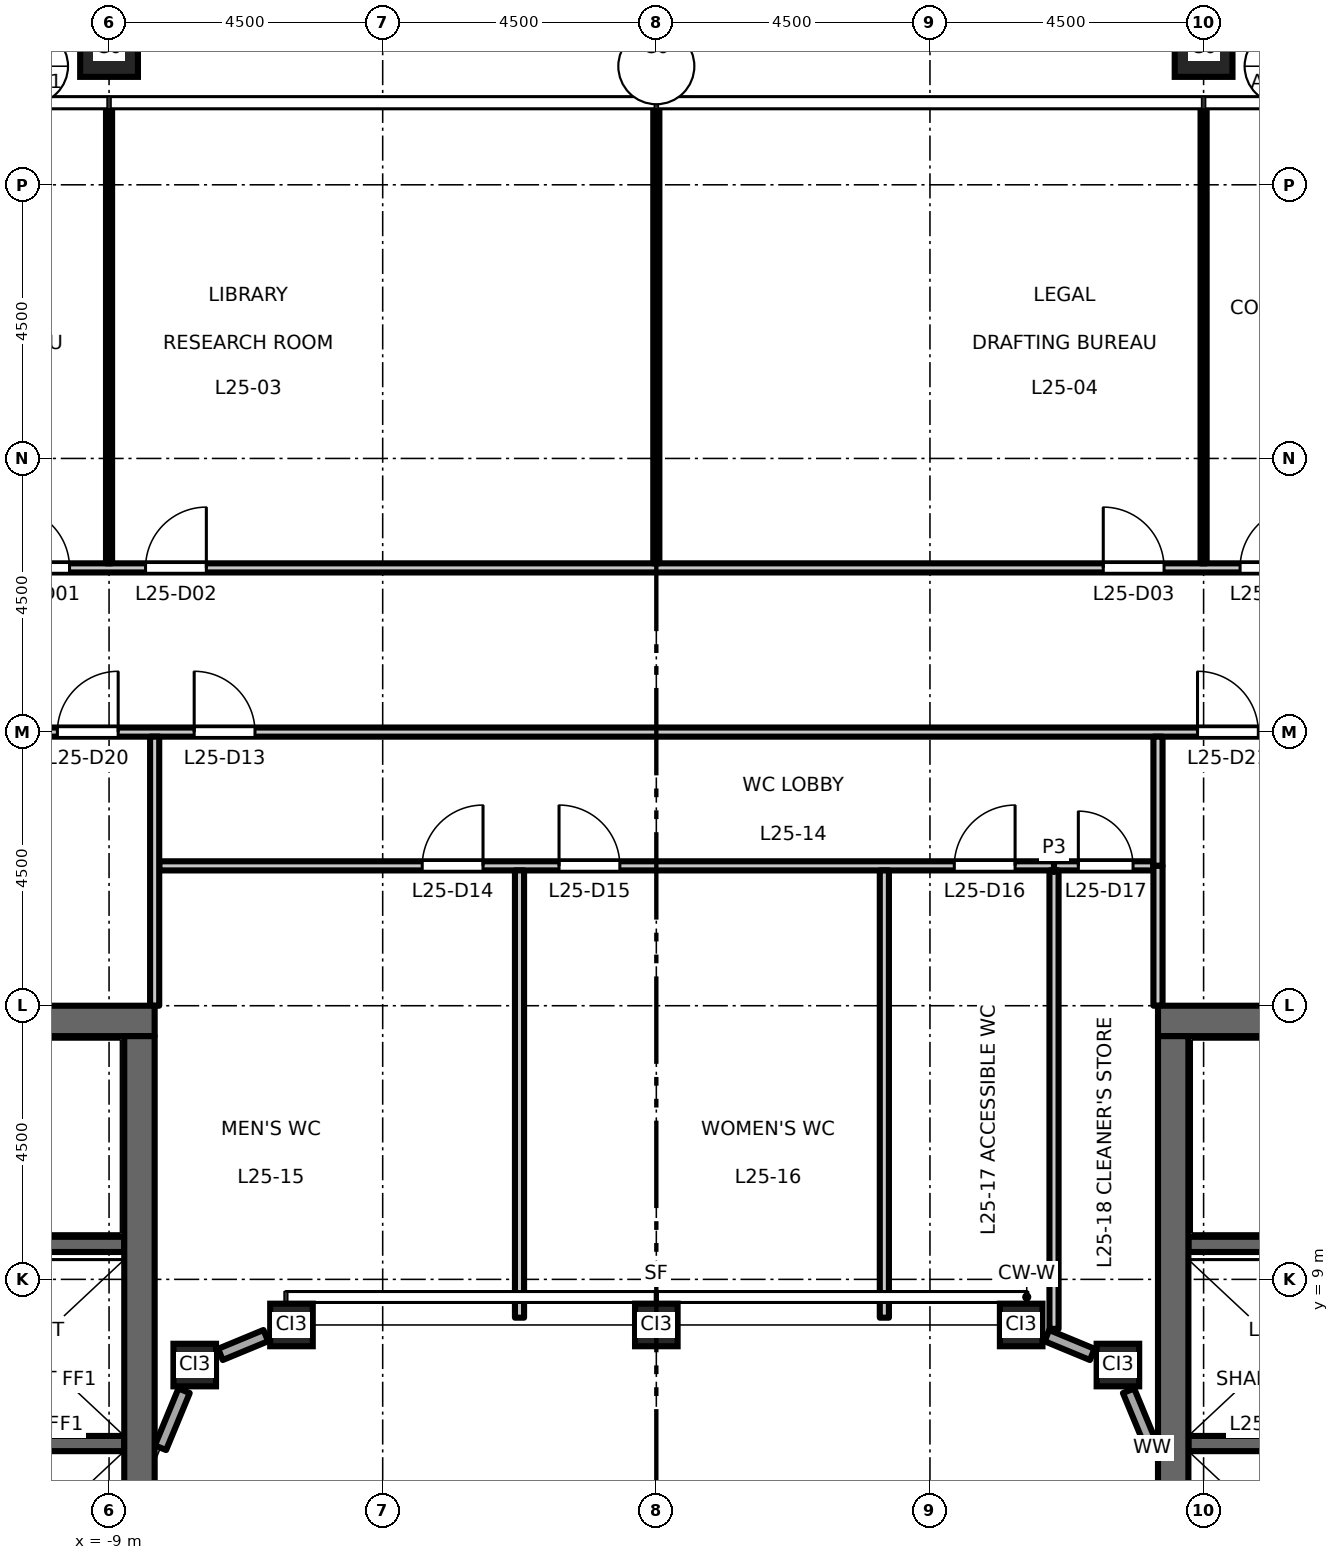
"""IFC4 building model, lengths in metres.
Left out: names, types, materials, properties, quantities, classifications, styles, units other than length and angle.
Written with IfcOpenShell. Run it as: python <this file> out.ifc"""

import sys

from ifc_helpers import new_model, si_unit, direction, frame, frame_2d, origin, origin_2d, place, context, subcontext, project, spatial, rectangle, hollow_rectangle, extrude, element, fill, save


model = new_model("IFC4")
c1 = context("Model", 3, precision=1e-05, world=origin(), true_north=direction((0.0, 1.0)))
c2 = subcontext(c1, "Body", "Model", "MODEL_VIEW")
j1 = project(units=[si_unit("LENGTHUNIT", "METRE"), si_unit("PLANEANGLEUNIT", "RADIAN")], contexts=[c1])
p1 = place(None, origin())
s1 = spatial("IfcSite", under=j1, at=p1, CompositionType="ELEMENT")
p2 = place(p1, origin())
s2 = spatial("IfcBuilding", under=s1, at=p2, CompositionType="ELEMENT")
p3 = place(p2, frame((0.0, 0.0, 118.2)))
s3 = spatial("IfcBuildingStorey", under=s2, at=p3, CompositionType="ELEMENT", Elevation=118.2)
for number, where, z_axis, x_axis in (
    (1, (9.0, 29.25, 0.0), (0.0, 0.0, 1.0), (1.0, 0.0, 0.0)),
    (2, (0.0, 29.25, 0.0), (0.0, 0.0, 1.0), (1.0, 0.0, 0.0)),
    (3, (-9.0, 29.25, 0.0), (0.0, 0.0, 1.0), (1.0, 0.0, 0.0)),
):
    element("IfcColumn", number, at=place(p3, frame(where, z_axis=z_axis, x_axis=x_axis)), inside=s3, PredefinedType="COLUMN", context=c2, shape_type="SweptSolid", body=[
        extrude(hollow_rectangle(XDim=0.95, YDim=0.95, WallThickness=0.055, at=origin_2d()), origin(), (0.0, 0.0, 1.0), 4.5),
    ])
for number, where, z_axis, x_axis in (
    (4, (-7.591, 7.591, 0.0), (0.0, 0.0, 1.0), (1.0, 0.0, 0.0)),
    (5, (-6.0, 8.25, 0.0), (0.0, 0.0, 1.0), (1.0, 0.0, 0.0)),
    (6, (0.0, 8.25, 0.0), (0.0, 0.0, 1.0), (1.0, 0.0, 0.0)),
    (7, (6.0, 8.25, 0.0), (0.0, 0.0, 1.0), (1.0, 0.0, 0.0)),
    (8, (7.591, 7.591, 0.0), (0.0, 0.0, 1.0), (1.0, 0.0, 0.0)),
):
    element("IfcColumn", number, at=place(p3, frame(where, z_axis=z_axis, x_axis=x_axis)), inside=s3, PredefinedType="COLUMN", context=c2, shape_type="SweptSolid", body=[
        extrude(hollow_rectangle(XDim=0.7, YDim=0.7, WallThickness=0.04, at=origin_2d()), origin(), (0.0, 0.0, 1.0), 4.5),
    ])
p4 = place(p3, frame((-8.75, 6.3, 0.0), z_axis=(0.0, 0.0, 1.0), x_axis=(-1.0, 0.0, 0.0)))
e9 = element("IfcWall", 9, at=p4, inside=s3, PredefinedType="SHEAR", context=c2, shape_type="SweptSolid", body=[
    extrude(rectangle(XDim=3.1, YDim=0.25, at=frame_2d((1.55, 0.0))), origin(), (0.0, 0.0, 1.0), 4.35),
])
p5 = place(p3, frame((-8.75, 9.575, 0.0), z_axis=(0.0, 0.0, 1.0), x_axis=(-1.0, 0.0, 0.0)))
e10 = element("IfcWall", 10, at=p5, inside=s3, PredefinedType="SHEAR", context=c2, shape_type="SweptSolid", body=[
    extrude(rectangle(XDim=8.0, YDim=0.25, at=frame_2d((4.0, 0.0))), origin(), (0.0, 0.0, 1.0), 4.35),
])
p6 = place(p5, frame((6.65, 0.0, 0.0)))
e11 = element("IfcOpeningElement", 11, at=p6, cuts=e10, PredefinedType="OPENING", context=c2, shape_type="SweptSolid", body=[
    extrude(rectangle(XDim=1.1, YDim=2.1, at=frame_2d((0.55, 1.05))), frame((0.0, 0.135, 0.0), z_axis=(0.0, -1.0, 0.0), x_axis=(1.0, 0.0, 0.0)), (0.0, 0.0, 1.0), 0.27),
])
p7 = place(p3, frame((-8.25, 13.25, 0.0), z_axis=(0.0, 0.0, 1.0), x_axis=(-1.0, 0.0, 0.0)))
e12 = element("IfcWall", 12, at=p7, inside=s3, PredefinedType="SHEAR", context=c2, shape_type="SweptSolid", body=[
    extrude(rectangle(XDim=13.5, YDim=0.5, at=frame_2d((6.75, 0.0))), origin(), (0.0, 0.0, 1.0), 4.35),
])
p8 = place(p3, frame((-8.5, -13.0, 0.0), z_axis=(0.0, 0.0, 1.0), x_axis=(0.0, 1.0, 0.0)))
e13 = element("IfcWall", 13, at=p8, inside=s3, PredefinedType="SHEAR", context=c2, shape_type="SweptSolid", body=[
    extrude(rectangle(XDim=26.0, YDim=0.5, at=frame_2d((13.0, 0.0))), origin(), (0.0, 0.0, 1.0), 4.35),
])
p9 = place(p3, frame((8.75, 6.3, 0.0), z_axis=(0.0, 0.0, 1.0), x_axis=(1.0, 0.0, 0.0)))
e14 = element("IfcWall", 14, at=p9, inside=s3, PredefinedType="SHEAR", context=c2, shape_type="SweptSolid", body=[
    extrude(rectangle(XDim=3.1, YDim=0.25, at=frame_2d((1.55, 0.0))), origin(), (0.0, 0.0, 1.0), 4.35),
])
p10 = place(p3, frame((8.75, 9.575, 0.0), z_axis=(0.0, 0.0, 1.0), x_axis=(1.0, 0.0, 0.0)))
e15 = element("IfcWall", 15, at=p10, inside=s3, PredefinedType="SHEAR", context=c2, shape_type="SweptSolid", body=[
    extrude(rectangle(XDim=8.0, YDim=0.25, at=frame_2d((4.0, 0.0))), origin(), (0.0, 0.0, 1.0), 4.35),
])
p11 = place(p10, frame((6.65, 0.0, 0.0)))
e16 = element("IfcOpeningElement", 16, at=p11, cuts=e15, PredefinedType="OPENING", context=c2, shape_type="SweptSolid", body=[
    extrude(rectangle(XDim=1.1, YDim=2.1, at=frame_2d((0.55, 1.05))), frame((0.0, 0.135, 0.0), z_axis=(0.0, -1.0, 0.0), x_axis=(1.0, 0.0, 0.0)), (0.0, 0.0, 1.0), 0.27),
])
p12 = place(p3, frame((8.25, 13.25, 0.0), z_axis=(0.0, 0.0, 1.0), x_axis=(1.0, 0.0, 0.0)))
e17 = element("IfcWall", 17, at=p12, inside=s3, PredefinedType="SHEAR", context=c2, shape_type="SweptSolid", body=[
    extrude(rectangle(XDim=13.5, YDim=0.5, at=frame_2d((6.75, 0.0))), origin(), (0.0, 0.0, 1.0), 4.35),
])
p13 = place(p3, frame((8.5, -13.0, 0.0), z_axis=(0.0, 0.0, 1.0), x_axis=(0.0, 1.0, 0.0)))
e18 = element("IfcWall", 18, at=p13, inside=s3, PredefinedType="SHEAR", context=c2, shape_type="SweptSolid", body=[
    extrude(rectangle(XDim=26.0, YDim=0.5, at=frame_2d((13.0, 0.0))), origin(), (0.0, 0.0, 1.0), 4.35),
])
p14 = place(p3, frame((8.154, 6.231, 0.0), z_axis=(0.0, 0.0, 1.0), x_axis=(-0.382769662028, 0.923843810301, 0.0)))
e19 = element("IfcWall", 19, at=p14, inside=s3, PredefinedType="STANDARD", context=c2, shape_type="SweptSolid", body=[
    extrude(rectangle(XDim=1.015, YDim=0.2, at=frame_2d((0.507, 0.0))), origin(), (0.0, 0.0, 1.0), 3.826),
])
for number, where, z_axis, x_axis in (
    (20, (7.168, 7.766, 0.0), (0.0, 0.0, 1.0), (-0.924, 0.383, 0.0)),
    (21, (-6.423, 8.075, 0.0), (0.0, 0.0, 1.0), (-0.924, -0.383, 0.0)),
):
    element("IfcWall", number, at=place(p3, frame(where, z_axis=z_axis, x_axis=x_axis)), inside=s3, PredefinedType="STANDARD", context=c2, shape_type="SweptSolid", body=[
        extrude(rectangle(XDim=0.807, YDim=0.2, at=frame_2d((0.404, 0.0))), origin(), (0.0, 0.0, 1.0), 3.826),
    ])
p15 = place(p3, frame((-7.766, 7.168, 0.0), z_axis=(0.0, 0.0, 1.0), x_axis=(-0.382769662028, -0.923843810301, 0.0)))
e22 = element("IfcWall", 22, at=p15, inside=s3, PredefinedType="STANDARD", context=c2, shape_type="SweptSolid", body=[
    extrude(rectangle(XDim=1.015, YDim=0.2, at=frame_2d((0.507, 0.0))), origin(), (0.0, 0.0, 1.0), 3.826),
])
p16 = place(p3, frame((-8.175, 15.8, 0.0), z_axis=(0.0, 0.0, 1.0), x_axis=(1.0, 0.0, 0.0)))
e23 = element("IfcWall", 23, at=p16, inside=s3, PredefinedType="PARTITIONING", context=c2, shape_type="SweptSolid", body=[
    extrude(rectangle(XDim=14.715, YDim=0.15, at=frame_2d((7.357, 0.0))), origin(), (0.0, 0.0, 1.0), 4.35),
])
p17 = place(p16, frame((4.325, 0.0, 0.0)))
e24 = element("IfcOpeningElement", 24, at=p17, cuts=e23, PredefinedType="OPENING", context=c2, shape_type="SweptSolid", body=[
    extrude(rectangle(XDim=1.0, YDim=2.1, at=frame_2d((0.5, 1.05))), frame((0.0, 0.085, 0.0), z_axis=(0.0, -1.0, 0.0), x_axis=(1.0, 0.0, 0.0)), (0.0, 0.0, 1.0), 0.17),
])
p18 = place(p16, frame((6.575, 0.0, 0.0)))
e25 = element("IfcOpeningElement", 25, at=p18, cuts=e23, PredefinedType="OPENING", context=c2, shape_type="SweptSolid", body=[
    extrude(rectangle(XDim=1.0, YDim=2.1, at=frame_2d((0.5, 1.05))), frame((0.0, 0.085, 0.0), z_axis=(0.0, -1.0, 0.0), x_axis=(1.0, 0.0, 0.0)), (0.0, 0.0, 1.0), 0.17),
])
p19 = place(p16, frame((13.075, 0.0, 0.0)))
e26 = element("IfcOpeningElement", 26, at=p19, cuts=e23, PredefinedType="OPENING", context=c2, shape_type="SweptSolid", body=[
    extrude(rectangle(XDim=1.0, YDim=2.1, at=frame_2d((0.5, 1.05))), frame((0.0, 0.085, 0.0), z_axis=(0.0, -1.0, 0.0), x_axis=(1.0, 0.0, 0.0)), (0.0, 0.0, 1.0), 0.17),
])
p20 = place(p3, frame((6.54, 15.8, 0.0), z_axis=(0.0, 0.0, 1.0), x_axis=(1.0, 0.0, 0.0)))
e27 = element("IfcWall", 27, at=p20, inside=s3, PredefinedType="PARTITIONING", context=c2, shape_type="SweptSolid", body=[
    extrude(rectangle(XDim=1.635, YDim=0.15, at=frame_2d((0.817, 0.0))), origin(), (0.0, 0.0, 1.0), 4.35),
])
p21 = place(p20, frame((0.4, 0.0, 0.0)))
e28 = element("IfcOpeningElement", 28, at=p21, cuts=e27, PredefinedType="OPENING", context=c2, shape_type="SweptSolid", body=[
    extrude(rectangle(XDim=0.9, YDim=2.1, at=frame_2d((0.45, 1.05))), frame((0.0, 0.085, 0.0), z_axis=(0.0, -1.0, 0.0), x_axis=(1.0, 0.0, 0.0)), (0.0, 0.0, 1.0), 0.17),
])
p22 = place(p3, frame((-21.825, 18.0, 0.0), z_axis=(0.0, 0.0, 1.0), x_axis=(1.0, 0.0, 0.0)))
e29 = element("IfcWall", 29, at=p22, inside=s3, PredefinedType="PARTITIONING", context=c2, shape_type="SweptSolid", body=[
    extrude(rectangle(XDim=43.65, YDim=0.15, at=frame_2d((21.825, 0.0))), origin(), (0.0, 0.0, 1.0), 4.35),
])
p23 = place(p22, frame((14.225, 0.0, 0.0)))
e30 = element("IfcOpeningElement", 30, at=p23, cuts=e29, PredefinedType="OPENING", context=c2, shape_type="SweptSolid", body=[
    extrude(rectangle(XDim=1.0, YDim=2.1, at=frame_2d((0.5, 1.05))), frame((0.0, 0.085, 0.0), z_axis=(0.0, -1.0, 0.0), x_axis=(1.0, 0.0, 0.0)), (0.0, 0.0, 1.0), 0.17),
])
p24 = place(p22, frame((11.975, 0.0, 0.0)))
e31 = element("IfcOpeningElement", 31, at=p24, cuts=e29, PredefinedType="OPENING", context=c2, shape_type="SweptSolid", body=[
    extrude(rectangle(XDim=1.0, YDim=2.1, at=frame_2d((0.5, 1.05))), frame((0.0, 0.085, 0.0), z_axis=(0.0, -1.0, 0.0), x_axis=(1.0, 0.0, 0.0)), (0.0, 0.0, 1.0), 0.17),
])
p25 = place(p22, frame((30.725, 0.0, 0.0)))
e32 = element("IfcOpeningElement", 32, at=p25, cuts=e29, PredefinedType="OPENING", context=c2, shape_type="SweptSolid", body=[
    extrude(rectangle(XDim=1.0, YDim=2.1, at=frame_2d((0.5, 1.05))), frame((0.0, 0.085, 0.0), z_axis=(0.0, -1.0, 0.0), x_axis=(1.0, 0.0, 0.0)), (0.0, 0.0, 1.0), 0.17),
])
p26 = place(p3, frame((-27.06, 20.7, 0.0), z_axis=(0.0, 0.0, 1.0), x_axis=(1.0, 0.0, 0.0)))
e33 = element("IfcWall", 33, at=p26, inside=s3, PredefinedType="PARTITIONING", context=c2, shape_type="SweptSolid", body=[
    extrude(rectangle(XDim=54.12, YDim=0.15, at=frame_2d((27.06, 0.0))), origin(), (0.0, 0.0, 1.0), 4.35),
])
p27 = place(p26, frame((16.41, 0.0, 0.0)))
e34 = element("IfcOpeningElement", 34, at=p27, cuts=e33, PredefinedType="OPENING", context=c2, shape_type="SweptSolid", body=[
    extrude(rectangle(XDim=1.0, YDim=2.1, at=frame_2d((0.5, 1.05))), frame((0.0, 0.085, 0.0), z_axis=(0.0, -1.0, 0.0), x_axis=(1.0, 0.0, 0.0)), (0.0, 0.0, 1.0), 0.17),
])
p28 = place(p26, frame((18.66, 0.0, 0.0)))
e35 = element("IfcOpeningElement", 35, at=p28, cuts=e33, PredefinedType="OPENING", context=c2, shape_type="SweptSolid", body=[
    extrude(rectangle(XDim=1.0, YDim=2.1, at=frame_2d((0.5, 1.05))), frame((0.0, 0.085, 0.0), z_axis=(0.0, -1.0, 0.0), x_axis=(1.0, 0.0, 0.0)), (0.0, 0.0, 1.0), 0.17),
])
p29 = place(p26, frame((34.41, 0.0, 0.0)))
e36 = element("IfcOpeningElement", 36, at=p29, cuts=e33, PredefinedType="OPENING", context=c2, shape_type="SweptSolid", body=[
    extrude(rectangle(XDim=1.0, YDim=2.1, at=frame_2d((0.5, 1.05))), frame((0.0, 0.085, 0.0), z_axis=(0.0, -1.0, 0.0), x_axis=(1.0, 0.0, 0.0)), (0.0, 0.0, 1.0), 0.17),
])
p30 = place(p26, frame((36.66, 0.0, 0.0)))
e37 = element("IfcOpeningElement", 37, at=p30, cuts=e33, PredefinedType="OPENING", context=c2, shape_type="SweptSolid", body=[
    extrude(rectangle(XDim=1.0, YDim=2.1, at=frame_2d((0.5, 1.05))), frame((0.0, 0.085, 0.0), z_axis=(0.0, -1.0, 0.0), x_axis=(1.0, 0.0, 0.0)), (0.0, 0.0, 1.0), 0.17),
])
p31 = place(p26, frame((7.41, 0.0, 0.0)))
e38 = element("IfcOpeningElement", 38, at=p31, cuts=e33, PredefinedType="OPENING", context=c2, shape_type="SweptSolid", body=[
    extrude(rectangle(XDim=1.0, YDim=2.1, at=frame_2d((0.5, 1.05))), frame((0.0, 0.085, 0.0), z_axis=(0.0, -1.0, 0.0), x_axis=(1.0, 0.0, 0.0)), (0.0, 0.0, 1.0), 0.17),
])
p32 = place(p26, frame((45.72, 0.0, 0.0)))
e39 = element("IfcOpeningElement", 39, at=p32, cuts=e33, PredefinedType="OPENING", context=c2, shape_type="SweptSolid", body=[
    extrude(rectangle(XDim=1.0, YDim=2.1, at=frame_2d((0.5, 1.05))), frame((0.0, 0.085, 0.0), z_axis=(0.0, -1.0, 0.0), x_axis=(1.0, 0.0, 0.0)), (0.0, 0.0, 1.0), 0.17),
])
p33 = place(p3, frame((-9.0, 20.775, 0.0), z_axis=(0.0, 0.0, 1.0), x_axis=(0.0, 1.0, 0.0)))
e40 = element("IfcWall", 40, at=p33, inside=s3, PredefinedType="PARTITIONING", context=c2, shape_type="SweptSolid", body=[
    extrude(rectangle(XDim=7.485, YDim=0.1, at=frame_2d((3.743, 0.0))), origin(), (0.0, 0.0, 1.0), 3.45),
])
p34 = place(p3, frame((-8.25, 13.5, 0.0), z_axis=(0.0, 0.0, 1.0), x_axis=(0.0, 1.0, 0.0)))
e41 = element("IfcWall", 41, at=p34, inside=s3, PredefinedType="PARTITIONING", context=c2, shape_type="SweptSolid", body=[
    extrude(rectangle(XDim=4.425, YDim=0.15, at=frame_2d((2.212, 0.0))), origin(), (0.0, 0.0, 1.0), 4.35),
])
p35 = place(p3, frame((-2.25, 8.37, 0.0), z_axis=(0.0, 0.0, 1.0), x_axis=(0.0, 1.0, 0.0)))
e42 = element("IfcWall", 42, at=p35, inside=s3, PredefinedType="PARTITIONING", context=c2, shape_type="SweptSolid", body=[
    extrude(rectangle(XDim=7.355, YDim=0.15, at=frame_2d((3.677, 0.0))), origin(), (0.0, 0.0, 1.0), 4.35),
])
p36 = place(p3, frame((0.0, 20.775, 0.0), z_axis=(0.0, 0.0, 1.0), x_axis=(0.0, 1.0, 0.0)))
e43 = element("IfcWall", 43, at=p36, inside=s3, PredefinedType="PARTITIONING", context=c2, shape_type="SweptSolid", body=[
    extrude(rectangle(XDim=7.485, YDim=0.1, at=frame_2d((3.743, 0.0))), origin(), (0.0, 0.0, 1.0), 3.45),
])
p37 = place(p3, frame((3.75, 8.37, 0.0), z_axis=(0.0, 0.0, 1.0), x_axis=(0.0, 1.0, 0.0)))
e44 = element("IfcWall", 44, at=p37, inside=s3, PredefinedType="PARTITIONING", context=c2, shape_type="SweptSolid", body=[
    extrude(rectangle(XDim=7.355, YDim=0.15, at=frame_2d((3.677, 0.0))), origin(), (0.0, 0.0, 1.0), 4.35),
])
p38 = place(p3, frame((6.54, 8.186, 0.0), z_axis=(0.0, 0.0, 1.0), x_axis=(0.0, 1.0, 0.0)))
e45 = element("IfcWall", 45, at=p38, inside=s3, PredefinedType="PARTITIONING", context=c2, shape_type="SweptSolid", body=[
    extrude(rectangle(XDim=7.539, YDim=0.15, at=frame_2d((3.77, 0.0))), origin(), (0.0, 0.0, 1.0), 4.35),
])
p39 = place(p3, frame((8.25, 15.8, 0.0), z_axis=(0.0, 0.0, 1.0), x_axis=(0.0, 1.0, 0.0)))
e46 = element("IfcWall", 46, at=p39, inside=s3, PredefinedType="PARTITIONING", context=c2, shape_type="SweptSolid", body=[
    extrude(rectangle(XDim=2.125, YDim=0.15, at=frame_2d((1.062, 0.0))), origin(), (0.0, 0.0, 1.0), 4.35),
])
p40 = place(p3, frame((8.25, 13.5, 0.0), z_axis=(0.0, 0.0, 1.0), x_axis=(0.0, 1.0, 0.0)))
e47 = element("IfcWall", 47, at=p40, inside=s3, PredefinedType="PARTITIONING", context=c2, shape_type="SweptSolid", body=[
    extrude(rectangle(XDim=2.3, YDim=0.15, at=frame_2d((1.15, 0.0))), origin(), (0.0, 0.0, 1.0), 4.35),
])
p41 = place(p3, frame((9.0, 20.775, 0.0), z_axis=(0.0, 0.0, 1.0), x_axis=(0.0, 1.0, 0.0)))
e48 = element("IfcWall", 48, at=p41, inside=s3, PredefinedType="PARTITIONING", context=c2, shape_type="SweptSolid", body=[
    extrude(rectangle(XDim=7.485, YDim=0.1, at=frame_2d((3.743, 0.0))), origin(), (0.0, 0.0, 1.0), 3.45),
])
p42 = place(p27, origin())
e49 = element("IfcDoor", 49, at=p42, inside=s3, OperationType="SINGLE_SWING_LEFT", PredefinedType="DOOR", context=c2, shape_type="SweptSolid", body=[
    extrude(rectangle(XDim=1.0, YDim=2.1, at=frame_2d((0.5, 1.05))), frame((0.0, 0.025, 0.0), z_axis=(0.0, -1.0, 0.0), x_axis=(1.0, 0.0, 0.0)), (0.0, 0.0, 1.0), 0.05),
])
fill(e34, e49)
p43 = place(p28, origin())
e50 = element("IfcDoor", 50, at=p43, inside=s3, OperationType="SINGLE_SWING_RIGHT", PredefinedType="DOOR", context=c2, shape_type="SweptSolid", body=[
    extrude(rectangle(XDim=1.0, YDim=2.1, at=frame_2d((0.5, 1.05))), frame((0.0, 0.025, 0.0), z_axis=(0.0, -1.0, 0.0), x_axis=(1.0, 0.0, 0.0)), (0.0, 0.0, 1.0), 0.05),
])
fill(e35, e50)
p44 = place(p29, origin())
e51 = element("IfcDoor", 51, at=p44, inside=s3, OperationType="SINGLE_SWING_LEFT", PredefinedType="DOOR", context=c2, shape_type="SweptSolid", body=[
    extrude(rectangle(XDim=1.0, YDim=2.1, at=frame_2d((0.5, 1.05))), frame((0.0, 0.025, 0.0), z_axis=(0.0, -1.0, 0.0), x_axis=(1.0, 0.0, 0.0)), (0.0, 0.0, 1.0), 0.05),
])
fill(e36, e51)
p45 = place(p30, origin())
e52 = element("IfcDoor", 52, at=p45, inside=s3, OperationType="SINGLE_SWING_RIGHT", PredefinedType="DOOR", context=c2, shape_type="SweptSolid", body=[
    extrude(rectangle(XDim=1.0, YDim=2.1, at=frame_2d((0.5, 1.05))), frame((0.0, 0.025, 0.0), z_axis=(0.0, -1.0, 0.0), x_axis=(1.0, 0.0, 0.0)), (0.0, 0.0, 1.0), 0.05),
])
fill(e37, e52)
p46 = place(p23, origin())
e53 = element("IfcDoor", 53, at=p46, inside=s3, OperationType="SINGLE_SWING_LEFT", PredefinedType="DOOR", context=c2, shape_type="SweptSolid", body=[
    extrude(rectangle(XDim=1.0, YDim=2.1, at=frame_2d((0.5, 1.05))), frame((0.0, 0.025, 0.0), z_axis=(0.0, -1.0, 0.0), x_axis=(1.0, 0.0, 0.0)), (0.0, 0.0, 1.0), 0.05),
])
fill(e30, e53)
p47 = place(p17, origin())
e54 = element("IfcDoor", 54, at=p47, inside=s3, OperationType="SINGLE_SWING_RIGHT", PredefinedType="DOOR", context=c2, shape_type="SweptSolid", body=[
    extrude(rectangle(XDim=1.0, YDim=2.1, at=frame_2d((0.5, 1.05))), frame((0.0, 0.025, 0.0), z_axis=(0.0, -1.0, 0.0), x_axis=(1.0, 0.0, 0.0)), (0.0, 0.0, 1.0), 0.05),
])
fill(e24, e54)
p48 = place(p18, origin())
e55 = element("IfcDoor", 55, at=p48, inside=s3, OperationType="SINGLE_SWING_LEFT", PredefinedType="DOOR", context=c2, shape_type="SweptSolid", body=[
    extrude(rectangle(XDim=1.0, YDim=2.1, at=frame_2d((0.5, 1.05))), frame((0.0, 0.025, 0.0), z_axis=(0.0, -1.0, 0.0), x_axis=(1.0, 0.0, 0.0)), (0.0, 0.0, 1.0), 0.05),
])
fill(e25, e55)
p49 = place(p19, origin())
e56 = element("IfcDoor", 56, at=p49, inside=s3, OperationType="SINGLE_SWING_RIGHT", PredefinedType="DOOR", context=c2, shape_type="SweptSolid", body=[
    extrude(rectangle(XDim=1.0, YDim=2.1, at=frame_2d((0.5, 1.05))), frame((0.0, 0.025, 0.0), z_axis=(0.0, -1.0, 0.0), x_axis=(1.0, 0.0, 0.0)), (0.0, 0.0, 1.0), 0.05),
])
fill(e26, e56)
p50 = place(p21, origin())
e57 = element("IfcDoor", 57, at=p50, inside=s3, OperationType="SINGLE_SWING_LEFT", PredefinedType="DOOR", context=c2, shape_type="SweptSolid", body=[
    extrude(rectangle(XDim=0.9, YDim=2.1, at=frame_2d((0.45, 1.05))), frame((0.0, 0.025, 0.0), z_axis=(0.0, -1.0, 0.0), x_axis=(1.0, 0.0, 0.0)), (0.0, 0.0, 1.0), 0.05),
])
fill(e28, e57)
p51 = place(p24, origin())
e58 = element("IfcDoor", 58, at=p51, inside=s3, OperationType="SINGLE_SWING_RIGHT", PredefinedType="DOOR", context=c2, shape_type="SweptSolid", body=[
    extrude(rectangle(XDim=1.0, YDim=2.1, at=frame_2d((0.5, 1.05))), frame((0.0, 0.025, 0.0), z_axis=(0.0, -1.0, 0.0), x_axis=(1.0, 0.0, 0.0)), (0.0, 0.0, 1.0), 0.05),
])
fill(e31, e58)
p52 = place(p25, origin())
e59 = element("IfcDoor", 59, at=p52, inside=s3, OperationType="SINGLE_SWING_LEFT", PredefinedType="DOOR", context=c2, shape_type="SweptSolid", body=[
    extrude(rectangle(XDim=1.0, YDim=2.1, at=frame_2d((0.5, 1.05))), frame((0.0, 0.025, 0.0), z_axis=(0.0, -1.0, 0.0), x_axis=(1.0, 0.0, 0.0)), (0.0, 0.0, 1.0), 0.05),
])
fill(e32, e59)
save(model, sys.argv[1])
